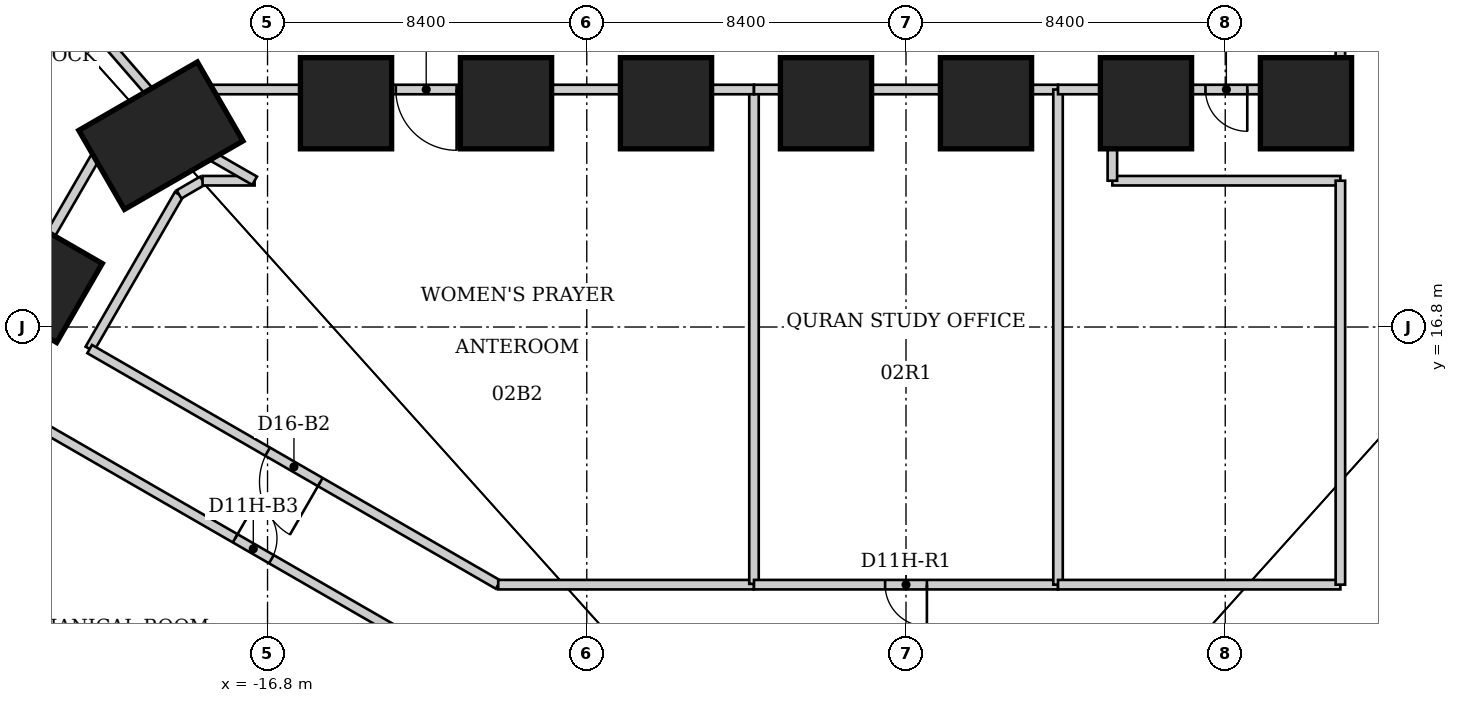
"""IFC4 building model, lengths in metres.
Left out: names, types, materials, properties, quantities, classifications, styles, units other than length and angle.
Written with IfcOpenShell. Run it as: python <this file> out.ifc"""

import sys

from ifc_helpers import new_model, si_unit, direction, frame, frame_2d, origin, origin_2d, place, context, subcontext, project, spatial, rectangle, extrude, element, fill, save


model = new_model("IFC4")
c1 = context("Model", 3, precision=1e-05, world=origin(), true_north=direction((0.0, 1.0)))
c2 = subcontext(c1, "Body", "Model", "MODEL_VIEW")
j1 = project(units=[si_unit("LENGTHUNIT", "METRE"), si_unit("PLANEANGLEUNIT", "RADIAN")], contexts=[c1])
p1 = place(None, origin())
s1 = spatial("IfcSite", under=j1, at=p1, CompositionType="ELEMENT")
p2 = place(p1, origin())
s2 = spatial("IfcBuilding", under=s1, at=p2, CompositionType="ELEMENT")
p3 = place(p2, frame((0.0, 0.0, 12.0)))
s3 = spatial("IfcBuildingStorey", under=s2, at=p3, CompositionType="ELEMENT", Elevation=12.0)
for number, where, z_axis, x_axis in (
    (1, (-14.735, 22.689, 0.0), (0.0, 0.0, 1.0), (0.0, 1.0, 0.0)),
    (2, (-10.525, 22.689, 0.0), (0.0, 0.0, 1.0), (0.0, 1.0, 0.0)),
    (3, (-6.315, 22.689, 0.0), (0.0, 0.0, 1.0), (0.0, 1.0, 0.0)),
    (4, (-2.105, 22.689, 0.0), (0.0, 0.0, 1.0), (0.0, 1.0, 0.0)),
    (5, (2.105, 22.689, 0.0), (0.0, 0.0, 1.0), (0.0, 1.0, 0.0)),
    (6, (6.315, 22.689, 0.0), (0.0, 0.0, 1.0), (0.0, 1.0, 0.0)),
    (7, (10.525, 22.689, 0.0), (0.0, 0.0, 1.0), (0.0, 1.0, 0.0)),
    (8, (-22.788, 18.032, 0.0), (0.0, 0.0, 1.0), (-0.866, 0.5, 0.0)),
):
    element("IfcColumn", number, at=place(p3, frame(where, z_axis=z_axis, x_axis=x_axis)), inside=s3, PredefinedType="COLUMN", context=c2, shape_type="SweptSolid", body=[
        extrude(rectangle(XDim=2.4, YDim=2.4, at=origin_2d()), origin(), (0.0, 0.0, 1.0), 6.0),
    ])
p4 = place(p3, frame((-19.606, 21.835, 0.0), z_axis=(0.0, 0.0, 1.0), x_axis=(-0.5, 0.866025403784, 0.0)))
e9 = element("IfcColumn", 9, at=p4, inside=s3, PredefinedType="COLUMN", context=c2, shape_type="SweptSolid", body=[
    extrude(rectangle(XDim=2.4, YDim=3.6, at=origin_2d()), origin(), (0.0, 0.0, 1.0), 6.0),
])
p5 = place(p3, frame((-22.68, 14.14, 0.0), z_axis=(0.0, 0.0, 1.0), x_axis=(0.866256251028, -0.499599947513, 0.0)))
e10 = element("IfcWall", 10, at=p5, inside=s3, PredefinedType="PARTITIONING", context=c2, shape_type="SweptSolid", body=[
    extrude(rectangle(XDim=12.71, YDim=0.25, at=frame_2d((6.355, 0.0))), origin(), (0.0, 0.0, 1.0), 5.84),
])
p6 = place(p5, frame((5.805, 0.0, 0.0)))
e11 = element("IfcOpeningElement", 11, at=p6, cuts=e10, PredefinedType="OPENING", context=c2, shape_type="SweptSolid", body=[
    extrude(rectangle(XDim=1.1, YDim=2.2, at=frame_2d((0.55, 1.1))), frame((0.0, 0.125, 0.0), z_axis=(0.0, -1.0, 0.0), x_axis=(1.0, 0.0, 0.0)), (0.0, 0.0, 1.0), 0.25),
])
p7 = place(p3, frame((-21.48, 16.22, 0.0), z_axis=(0.0, 0.0, 1.0), x_axis=(0.499999753078, 0.866025546345, 0.0)))
e12 = element("IfcWall", 12, at=p7, inside=s3, PredefinedType="PARTITIONING", context=c2, shape_type="SweptSolid", body=[
    extrude(rectangle(XDim=4.7, YDim=0.25, at=frame_2d((2.35, 0.0))), origin(), (0.0, 0.0, 1.0), 5.84),
])
p8 = place(p3, frame((-20.88, 22.05, 0.0), z_axis=(0.0, 0.0, 1.0), x_axis=(-0.50097690648, -0.86546065143, 0.0)))
e13 = element("IfcWall", 13, at=p8, inside=s3, PredefinedType="PARTITIONING", context=c2, shape_type="SweptSolid", body=[
    extrude(rectangle(XDim=5.35, YDim=0.25, at=frame_2d((2.675, 0.0))), origin(), (0.0, 0.0, 1.0), 4.04),
])
p9 = place(p3, frame((-20.23, 22.43, 0.0), z_axis=(0.0, 0.0, 1.0), x_axis=(-0.863331575042, -0.504637088942, 0.0)))
e14 = element("IfcWall", 14, at=p9, inside=s3, PredefinedType="PARTITIONING", context=c2, shape_type="SweptSolid", body=[
    extrude(rectangle(XDim=0.753, YDim=0.25, at=frame_2d((0.376, 0.0))), origin(), (0.0, 0.0, 1.0), 5.84),
])
p10 = place(p3, frame((-19.746, 22.708, 0.0), z_axis=(0.0, 0.0, 1.0), x_axis=(-0.867257505244, -0.49785983931, 0.0)))
e15 = element("IfcWall", 15, at=p10, inside=s3, PredefinedType="PARTITIONING", context=c2, shape_type="SweptSolid", body=[
    extrude(rectangle(XDim=0.443, YDim=0.25, at=frame_2d((0.221, 0.0))), origin(), (0.0, 0.0, 1.0), 5.84),
])
p11 = place(p3, frame((-19.69, 22.74, 0.0), z_axis=(0.0, 0.0, 1.0), x_axis=(-0.655186130594, 0.755467493859, 0.0)))
e16 = element("IfcWall", 16, at=p11, inside=s3, PredefinedType="PARTITIONING", context=c2, shape_type="SweptSolid", body=[
    extrude(rectangle(XDim=8.945, YDim=0.25, at=frame_2d((4.472, 0.0))), origin(), (0.0, 0.0, 1.0), 5.6),
])
p12 = place(p3, frame((-19.15, 23.05, 0.0), z_axis=(0.0, 0.0, 1.0), x_axis=(-0.867193315, -0.497971640175, 0.0)))
e17 = element("IfcWall", 17, at=p12, inside=s3, PredefinedType="PARTITIONING", context=c2, shape_type="SweptSolid", body=[
    extrude(rectangle(XDim=0.588, YDim=0.25, at=frame_2d((0.294, 0.0))), origin(), (0.0, 0.0, 1.0), 5.84),
])
p13 = place(p3, frame((-19.13, 20.29, 0.0), z_axis=(0.0, 0.0, 1.0), x_axis=(0.864827114446, 0.502069778138, 0.0)))
e18 = element("IfcWall", 18, at=p13, inside=s3, PredefinedType="PARTITIONING", context=c2, shape_type="SweptSolid", body=[
    extrude(rectangle(XDim=0.717, YDim=0.25, at=frame_2d((0.358, 0.0))), origin(), (0.0, 0.0, 1.0), 5.84),
])
p14 = place(p3, frame((-18.51, 20.65, 0.0), z_axis=(0.0, 0.0, 1.0), x_axis=(1.0, 0.0, 0.0)))
e19 = element("IfcWall", 19, at=p14, inside=s3, PredefinedType="PARTITIONING", context=c2, shape_type="SweptSolid", body=[
    extrude(rectangle(XDim=1.37, YDim=0.25, at=frame_2d((0.685, 0.0))), origin(), (0.0, 0.0, 1.0), 5.84),
])
p15 = place(p3, frame((-17.14, 20.65, 0.0), z_axis=(0.0, 0.0, 1.0), x_axis=(-0.866514787199, 0.49915140345, 0.0)))
e20 = element("IfcWall", 20, at=p15, inside=s3, PredefinedType="PARTITIONING", context=c2, shape_type="SweptSolid", body=[
    extrude(rectangle(XDim=3.566, YDim=0.25, at=frame_2d((1.783, 0.0))), origin(), (0.0, 0.0, 1.0), 5.84),
])
p16 = place(p3, frame((-10.73, 10.02, 0.0), z_axis=(0.0, 0.0, 1.0), x_axis=(-0.866254357941, 0.499603229922, 0.0)))
e21 = element("IfcWall", 21, at=p16, inside=s3, PredefinedType="PARTITIONING", context=c2, shape_type="SweptSolid", body=[
    extrude(rectangle(XDim=12.41, YDim=0.25, at=frame_2d((6.205, 0.0))), origin(), (0.0, 0.0, 1.0), 5.84),
])
p17 = place(p16, frame((5.405, 0.0, 0.0)))
e22 = element("IfcOpeningElement", 22, at=p17, cuts=e21, PredefinedType="OPENING", context=c2, shape_type="SweptSolid", body=[
    extrude(rectangle(XDim=1.6, YDim=2.4, at=frame_2d((0.8, 1.2))), frame((0.0, 0.125, 0.0), z_axis=(0.0, -1.0, 0.0), x_axis=(1.0, 0.0, 0.0)), (0.0, 0.0, 1.0), 0.25),
])
p18 = place(p3, frame((-4.0, 10.02, 0.0), z_axis=(0.0, 0.0, 1.0), x_axis=(-1.0, 0.0, 0.0)))
e23 = element("IfcWall", 23, at=p18, inside=s3, PredefinedType="PARTITIONING", context=c2, shape_type="SweptSolid", body=[
    extrude(rectangle(XDim=6.73, YDim=0.25, at=frame_2d((3.365, 0.0))), origin(), (0.0, 0.0, 1.0), 5.84),
])
p19 = place(p3, frame((-4.0, 10.04, 0.0), z_axis=(0.0, 0.0, 1.0), x_axis=(0.0, 1.0, 0.0)))
e24 = element("IfcWall", 24, at=p19, inside=s3, PredefinedType="PARTITIONING", context=c2, shape_type="SweptSolid", body=[
    extrude(rectangle(XDim=13.01, YDim=0.25, at=frame_2d((6.505, 0.0))), origin(), (0.0, 0.0, 1.0), 5.84),
])
p20 = place(p3, frame((-4.0, 23.05, 0.0), z_axis=(0.0, 0.0, 1.0), x_axis=(-1.0, 0.0, 0.0)))
e25 = element("IfcWall", 25, at=p20, inside=s3, PredefinedType="PARTITIONING", context=c2, shape_type="SweptSolid", body=[
    extrude(rectangle(XDim=15.15, YDim=0.25, at=frame_2d((7.575, 0.0))), origin(), (0.0, 0.0, 1.0), 4.04),
])
p21 = place(p20, frame((7.825, 0.0, 0.0)))
e26 = element("IfcOpeningElement", 26, at=p21, cuts=e25, PredefinedType="OPENING", context=c2, shape_type="SweptSolid", body=[
    extrude(rectangle(XDim=1.6, YDim=2.4, at=frame_2d((0.8, 1.2))), frame((0.0, 0.125, 0.0), z_axis=(0.0, -1.0, 0.0), x_axis=(1.0, 0.0, 0.0)), (0.0, 0.0, 1.0), 0.25),
])
p22 = place(p3, frame((4.0, 10.02, 0.0), z_axis=(0.0, 0.0, 1.0), x_axis=(-1.0, 0.0, 0.0)))
e27 = element("IfcWall", 27, at=p22, inside=s3, PredefinedType="PARTITIONING", context=c2, shape_type="SweptSolid", body=[
    extrude(rectangle(XDim=8.0, YDim=0.25, at=frame_2d((4.0, 0.0))), origin(), (0.0, 0.0, 1.0), 5.84),
])
p23 = place(p22, frame((3.45, 0.0, 0.0)))
e28 = element("IfcOpeningElement", 28, at=p23, cuts=e27, PredefinedType="OPENING", context=c2, shape_type="SweptSolid", body=[
    extrude(rectangle(XDim=1.1, YDim=2.2, at=frame_2d((0.55, 1.1))), frame((0.0, 0.125, 0.0), z_axis=(0.0, -1.0, 0.0), x_axis=(1.0, 0.0, 0.0)), (0.0, 0.0, 1.0), 0.25),
])
p24 = place(p3, frame((4.0, 23.05, 0.0), z_axis=(0.0, 0.0, 1.0), x_axis=(-1.0, 0.0, 0.0)))
e29 = element("IfcWall", 29, at=p24, inside=s3, PredefinedType="PARTITIONING", context=c2, shape_type="SweptSolid", body=[
    extrude(rectangle(XDim=8.0, YDim=0.25, at=frame_2d((4.0, 0.0))), origin(), (0.0, 0.0, 1.0), 4.04),
])
p25 = place(p3, frame((4.0, 23.05, 0.0), z_axis=(0.0, 0.0, 1.0), x_axis=(0.0, -1.0, 0.0)))
e30 = element("IfcWall", 30, at=p25, inside=s3, PredefinedType="PARTITIONING", context=c2, shape_type="SweptSolid", body=[
    extrude(rectangle(XDim=13.03, YDim=0.25, at=frame_2d((6.515, 0.0))), origin(), (0.0, 0.0, 1.0), 5.84),
])
p26 = place(p3, frame((5.43, 20.65, 0.0), z_axis=(0.0, 0.0, 1.0), x_axis=(1.0, 0.0, 0.0)))
e31 = element("IfcWall", 31, at=p26, inside=s3, PredefinedType="PARTITIONING", context=c2, shape_type="SweptSolid", body=[
    extrude(rectangle(XDim=6.0, YDim=0.25, at=frame_2d((3.0, 0.0))), origin(), (0.0, 0.0, 1.0), 5.84),
])
p27 = place(p3, frame((5.43, 23.05, 0.0), z_axis=(0.0, 0.0, 1.0), x_axis=(-1.0, 0.0, 0.0)))
e32 = element("IfcWall", 32, at=p27, inside=s3, PredefinedType="PARTITIONING", context=c2, shape_type="SweptSolid", body=[
    extrude(rectangle(XDim=1.43, YDim=0.25, at=frame_2d((0.715, 0.0))), origin(), (0.0, 0.0, 1.0), 4.04),
])
p28 = place(p3, frame((5.43, 23.05, 0.0), z_axis=(0.0, 0.0, 1.0), x_axis=(0.0, -1.0, 0.0)))
e33 = element("IfcWall", 33, at=p28, inside=s3, PredefinedType="PARTITIONING", context=c2, shape_type="SweptSolid", body=[
    extrude(rectangle(XDim=2.4, YDim=0.25, at=frame_2d((1.2, 0.0))), origin(), (0.0, 0.0, 1.0), 5.84),
])
p29 = place(p3, frame((11.43, 10.02, 0.0), z_axis=(0.0, 0.0, 1.0), x_axis=(-1.0, 0.0, 0.0)))
e34 = element("IfcWall", 34, at=p29, inside=s3, PredefinedType="PARTITIONING", context=c2, shape_type="SweptSolid", body=[
    extrude(rectangle(XDim=7.43, YDim=0.25, at=frame_2d((3.715, 0.0))), origin(), (0.0, 0.0, 1.0), 5.84),
])
p30 = place(p3, frame((11.43, 20.65, 0.0), z_axis=(0.0, 0.0, 1.0), x_axis=(0.0, -1.0, 0.0)))
e35 = element("IfcWall", 35, at=p30, inside=s3, PredefinedType="PARTITIONING", context=c2, shape_type="SweptSolid", body=[
    extrude(rectangle(XDim=10.63, YDim=0.25, at=frame_2d((5.315, 0.0))), origin(), (0.0, 0.0, 1.0), 5.84),
])
p31 = place(p3, frame((11.43, 23.05, 0.0), z_axis=(0.0, 0.0, 1.0), x_axis=(-1.0, 0.0, 0.0)))
e36 = element("IfcWall", 36, at=p31, inside=s3, PredefinedType="PARTITIONING", context=c2, shape_type="SweptSolid", body=[
    extrude(rectangle(XDim=6.0, YDim=0.25, at=frame_2d((3.0, 0.0))), origin(), (0.0, 0.0, 1.0), 4.04),
])
p32 = place(p31, frame((2.45, 0.0, 0.0)))
e37 = element("IfcOpeningElement", 37, at=p32, cuts=e36, PredefinedType="OPENING", context=c2, shape_type="SweptSolid", body=[
    extrude(rectangle(XDim=1.1, YDim=2.2, at=frame_2d((0.55, 1.1))), frame((0.0, 0.125, 0.0), z_axis=(0.0, -1.0, 0.0), x_axis=(1.0, 0.0, 0.0)), (0.0, 0.0, 1.0), 0.25),
])
p33 = place(p3, frame((11.43, 25.2, 0.0), z_axis=(0.0, 0.0, 1.0), x_axis=(0.0, -1.0, 0.0)))
e38 = element("IfcWall", 38, at=p33, inside=s3, PredefinedType="PARTITIONING", context=c2, shape_type="SweptSolid", body=[
    extrude(rectangle(XDim=2.15, YDim=0.25, at=frame_2d((1.075, 0.0))), origin(), (0.0, 0.0, 1.0), 5.6),
])
p34 = place(p3, frame((12.23, 3.24, 0.0), z_axis=(0.0, 0.0, 1.0), x_axis=(0.866071776036, 0.499919672301, 0.0)))
e39 = element("IfcWall", 39, at=p34, inside=s3, PredefinedType="PARTITIONING", context=c2, shape_type="SweptSolid", body=[
    extrude(rectangle(XDim=14.502, YDim=0.25, at=frame_2d((7.251, 0.0))), origin(), (0.0, 0.0, 1.0), 5.84),
])
p35 = place(p32, origin())
e40 = element("IfcDoor", 40, at=p35, inside=s3, OperationType="SINGLE_SWING_LEFT", PredefinedType="DOOR", context=c2, shape_type="SweptSolid", body=[
    extrude(rectangle(XDim=1.1, YDim=2.2, at=frame_2d((0.55, 1.1))), frame((0.0, 0.025, 0.0), z_axis=(0.0, -1.0, 0.0), x_axis=(1.0, 0.0, 0.0)), (0.0, 0.0, 1.0), 0.05),
])
fill(e37, e40)
p36 = place(p23, origin())
e41 = element("IfcDoor", 41, at=p36, inside=s3, OperationType="SINGLE_SWING_LEFT", PredefinedType="DOOR", context=c2, shape_type="SweptSolid", body=[
    extrude(rectangle(XDim=1.1, YDim=2.2, at=frame_2d((0.55, 1.1))), frame((0.0, 0.025, 0.0), z_axis=(0.0, -1.0, 0.0), x_axis=(1.0, 0.0, 0.0)), (0.0, 0.0, 1.0), 0.05),
])
fill(e28, e41)
p37 = place(p17, origin())
e42 = element("IfcDoor", 42, at=p37, inside=s3, OperationType="DOUBLE_DOOR_SINGLE_SWING", PredefinedType="DOOR", context=c2, shape_type="SweptSolid", body=[
    extrude(rectangle(XDim=1.6, YDim=2.4, at=frame_2d((0.8, 1.2))), frame((0.0, 0.025, 0.0), z_axis=(0.0, -1.0, 0.0), x_axis=(1.0, 0.0, 0.0)), (0.0, 0.0, 1.0), 0.05),
])
fill(e22, e42)
p38 = place(p6, origin())
e43 = element("IfcDoor", 43, at=p38, inside=s3, OperationType="SINGLE_SWING_LEFT", PredefinedType="DOOR", context=c2, shape_type="SweptSolid", body=[
    extrude(rectangle(XDim=1.1, YDim=2.2, at=frame_2d((0.55, 1.1))), frame((0.0, 0.025, 0.0), z_axis=(0.0, -1.0, 0.0), x_axis=(1.0, 0.0, 0.0)), (0.0, 0.0, 1.0), 0.05),
])
fill(e11, e43)
p39 = place(p21, origin())
e44 = element("IfcDoor", 44, at=p39, inside=s3, OperationType="DOUBLE_DOOR_SINGLE_SWING", PredefinedType="DOOR", context=c2, shape_type="SweptSolid", body=[
    extrude(rectangle(XDim=1.6, YDim=2.4, at=frame_2d((0.8, 1.2))), frame((0.0, 0.025, 0.0), z_axis=(0.0, -1.0, 0.0), x_axis=(1.0, 0.0, 0.0)), (0.0, 0.0, 1.0), 0.05),
])
fill(e26, e44)
save(model, sys.argv[1])
